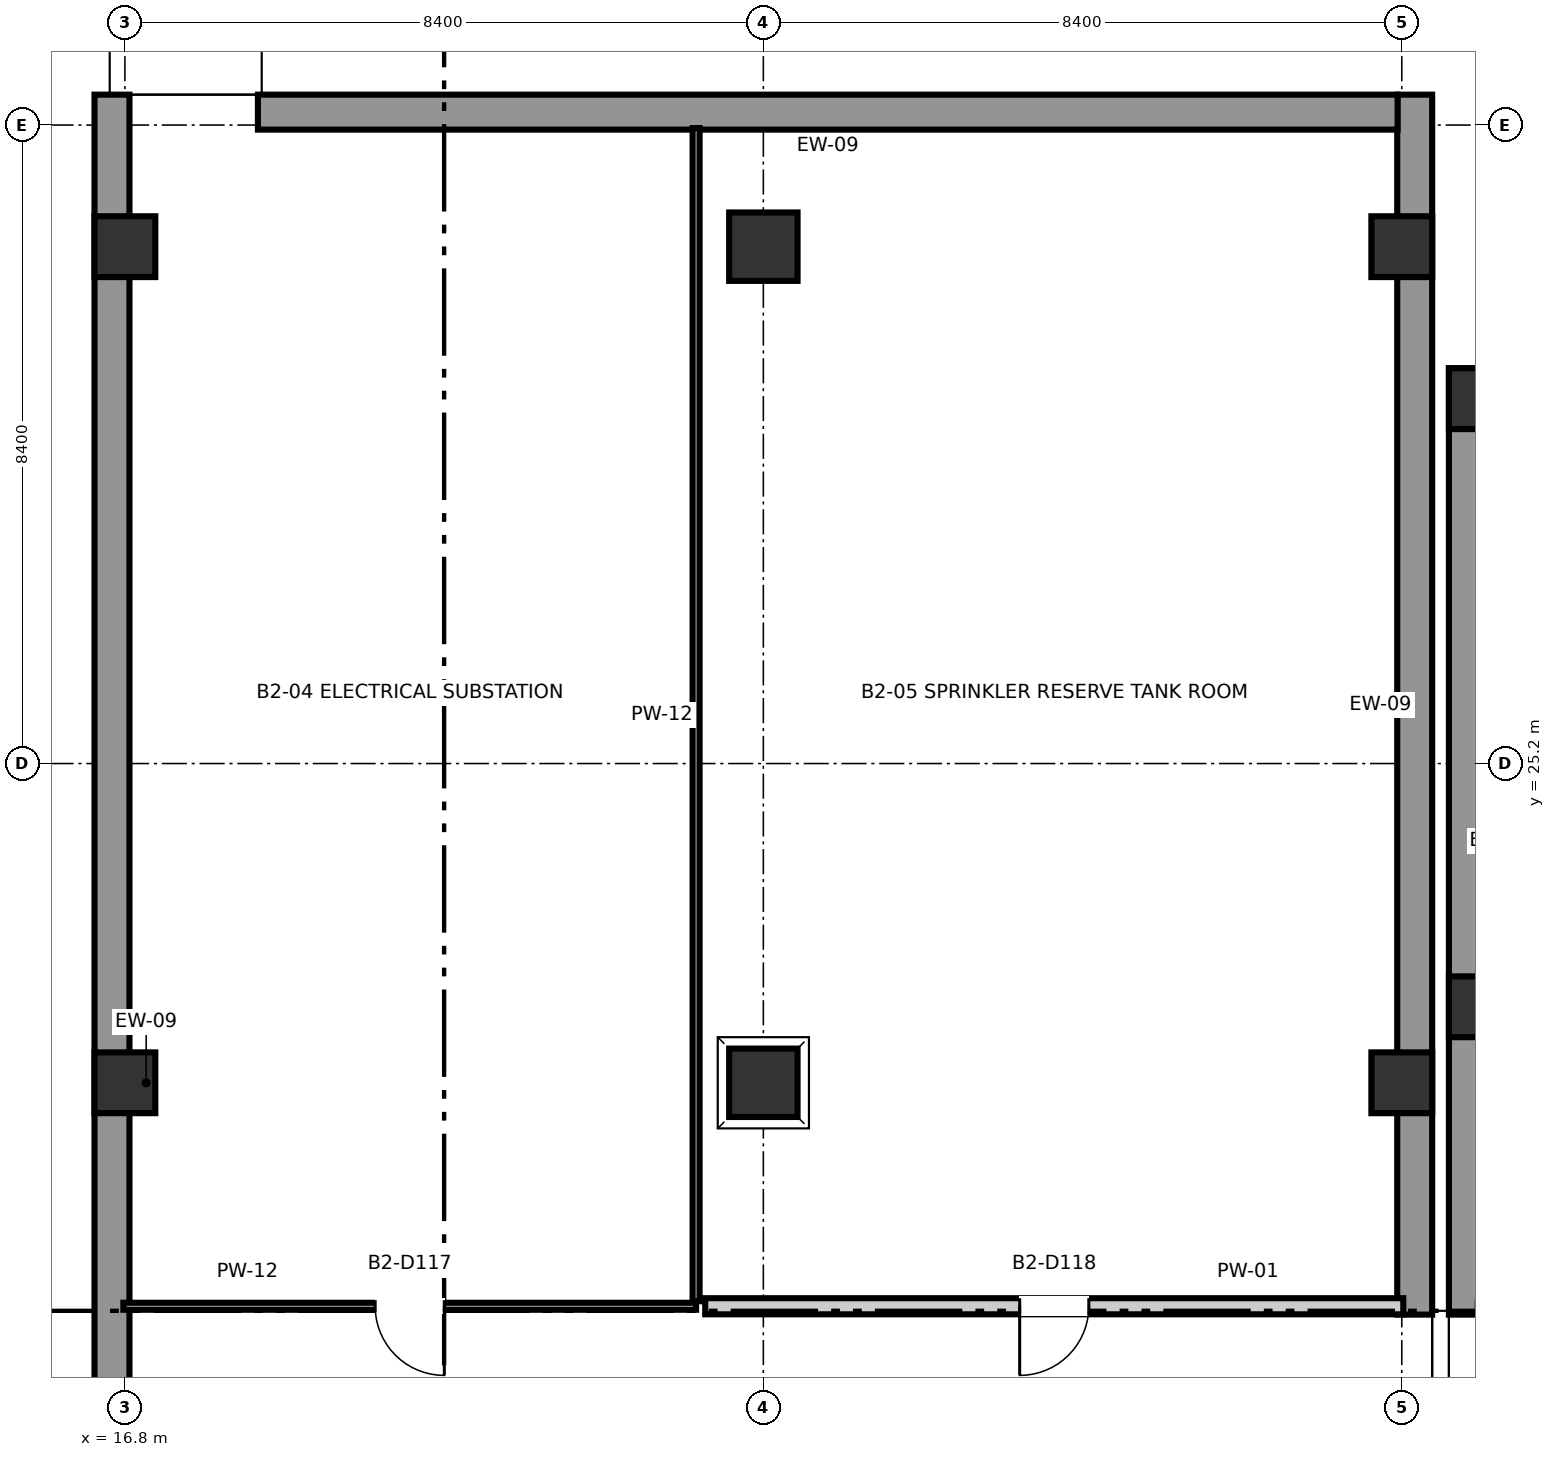
"""IFC4 building model, lengths in metres.
Left out: names, types, materials, properties, quantities, classifications, styles, units other than length and angle.
Written with IfcOpenShell. Run it as: python <this file> out.ifc"""

import sys

from ifc_helpers import new_model, si_unit, direction, frame, frame_2d, origin, origin_2d, place, context, subcontext, project, spatial, rectangle, extrude, element, fill, save


model = new_model("IFC4")
c1 = context("Model", 3, precision=1e-05, world=origin(), true_north=direction((0.0, 1.0)))
c2 = subcontext(c1, "Body", "Model", "MODEL_VIEW")
j1 = project(units=[si_unit("LENGTHUNIT", "METRE"), si_unit("PLANEANGLEUNIT", "RADIAN")], contexts=[c1])
p1 = place(None, origin())
s1 = spatial("IfcSite", under=j1, at=p1, CompositionType="ELEMENT")
p2 = place(p1, origin())
s2 = spatial("IfcBuilding", under=s1, at=p2, CompositionType="ELEMENT")
p3 = place(p2, frame((0.0, 0.0, -8.4)))
s3 = spatial("IfcBuildingStorey", under=s2, at=p3, CompositionType="ELEMENT", Elevation=-8.4)
for number, where, z_axis, x_axis in (
    (1, (16.8, 21.0, 0.0), (0.0, 0.0, 1.0), (1.0, 0.0, 0.0)),
    (2, (16.8, 32.0, 0.0), (0.0, 0.0, 1.0), (1.0, 0.0, 0.0)),
):
    element("IfcColumn", number, at=place(p3, frame(where, z_axis=z_axis, x_axis=x_axis)), inside=s3, PredefinedType="COLUMN", context=c2, shape_type="SweptSolid", body=[
        extrude(rectangle(XDim=0.8, YDim=0.8, at=origin_2d()), origin(), (0.0, 0.0, 1.0), 4.2),
    ])
for number, where, z_axis, x_axis in (
    (3, (25.2, 21.0, 0.0), (0.0, 0.0, 1.0), (1.0, 0.0, 0.0)),
    (4, (25.2, 32.0, 0.0), (0.0, 0.0, 1.0), (1.0, 0.0, 0.0)),
):
    element("IfcColumn", number, at=place(p3, frame(where, z_axis=z_axis, x_axis=x_axis)), inside=s3, PredefinedType="COLUMN", context=c2, shape_type="SweptSolid", body=[
        extrude(rectangle(XDim=0.9, YDim=0.9, at=origin_2d()), origin(), (0.0, 0.0, 1.0), 4.2),
    ])
for number, where, z_axis, x_axis in (
    (5, (33.6, 21.0, 0.0), (0.0, 0.0, 1.0), (1.0, 0.0, 0.0)),
    (6, (33.6, 32.0, 0.0), (0.0, 0.0, 1.0), (1.0, 0.0, 0.0)),
    (7, (34.62, 22.0, 0.0), (0.0, 0.0, 1.0), (1.0, 0.0, 0.0)),
    (8, (34.62, 30.0, 0.0), (0.0, 0.0, 1.0), (1.0, 0.0, 0.0)),
):
    element("IfcColumn", number, at=place(p3, frame(where, z_axis=z_axis, x_axis=x_axis)), inside=s3, PredefinedType="COLUMN", context=c2, shape_type="SweptSolid", body=[
        extrude(rectangle(XDim=0.8, YDim=0.8, at=origin_2d()), origin(), (0.0, 0.0, 1.0), 4.2),
    ])
p4 = place(p3, frame((33.77, 17.95, 0.0), z_axis=(0.0, 0.0, 1.0), x_axis=(0.0, 1.0, 0.0)))
e9 = element("IfcWall", 9, at=p4, inside=s3, PredefinedType="SOLIDWALL", context=c2, shape_type="SweptSolid", body=[
    extrude(rectangle(XDim=16.05, YDim=0.46, at=frame_2d((8.025, 0.0))), origin(), (0.0, 0.0, 1.0), 4.2),
])
p5 = place(p3, frame((33.545, 33.77, 0.0), z_axis=(0.0, 0.0, 1.0), x_axis=(-1.0, 0.0, 0.0)))
e10 = element("IfcWall", 10, at=p5, inside=s3, PredefinedType="SOLIDWALL", context=c2, shape_type="SweptSolid", body=[
    extrude(rectangle(XDim=14.995, YDim=0.46, at=frame_2d((7.498, 0.0))), origin(), (0.0, 0.0, 1.0), 4.2),
])
p6 = place(p3, frame((16.63, 34.0, 0.0), z_axis=(0.0, 0.0, 1.0), x_axis=(0.0, -1.0, 0.0)))
e11 = element("IfcWall", 11, at=p6, inside=s3, PredefinedType="SOLIDWALL", context=c2, shape_type="SweptSolid", body=[
    extrude(rectangle(XDim=26.0, YDim=0.46, at=frame_2d((13.0, 0.0))), origin(), (0.0, 0.0, 1.0), 4.2),
])
p7 = place(p3, frame((34.45, 30.4, 0.0), z_axis=(0.0, 0.0, 1.0), x_axis=(0.0, -1.0, 0.0)))
e12 = element("IfcWall", 12, at=p7, inside=s3, PredefinedType="SOLIDWALL", context=c2, shape_type="SweptSolid", body=[
    extrude(rectangle(XDim=12.45, YDim=0.46, at=frame_2d((6.225, 0.0))), origin(), (0.0, 0.0, 1.0), 4.2),
])
p8 = place(p3, frame((16.78, 18.06, 0.0), z_axis=(0.0, 0.0, 1.0), x_axis=(1.0, 0.0, 0.0)))
e13 = element("IfcWall", 13, at=p8, inside=s3, PredefinedType="PARTITIONING", context=c2, shape_type="SweptSolid", body=[
    extrude(rectangle(XDim=7.535, YDim=0.092, at=frame_2d((3.768, 0.0))), origin(), (0.0, 0.0, 1.0), 3.88),
])
p9 = place(p8, frame((3.312, 0.0, 0.0)))
e14 = element("IfcOpeningElement", 14, at=p9, cuts=e13, PredefinedType="OPENING", context=c2, shape_type="SweptSolid", body=[
    extrude(rectangle(XDim=0.91, YDim=2.04, at=frame_2d((0.455, 1.02))), frame((0.0, 0.061, 0.0), z_axis=(0.0, -1.0, 0.0), x_axis=(1.0, 0.0, 0.0)), (0.0, 0.0, 1.0), 0.122),
])
p10 = place(p3, frame((24.315, 18.126, 0.0), z_axis=(0.0, 0.0, 1.0), x_axis=(0.0, 1.0, 0.0)))
e15 = element("IfcWall", 15, at=p10, inside=s3, PredefinedType="PARTITIONING", context=c2, shape_type="SweptSolid", body=[
    extrude(rectangle(XDim=15.434, YDim=0.092, at=frame_2d((7.717, 0.0))), origin(), (0.0, 0.0, 1.0), 3.88),
])
p11 = place(p3, frame((24.435, 18.06, 0.0), z_axis=(0.0, 0.0, 1.0), x_axis=(1.0, 0.0, 0.0)))
e16 = element("IfcWall", 16, at=p11, inside=s3, PredefinedType="PARTITIONING", context=c2, shape_type="SweptSolid", body=[
    extrude(rectangle(XDim=9.185, YDim=0.212, at=frame_2d((4.593, 0.0))), origin(), (0.0, 0.0, 1.0), 3.88),
])
p12 = place(p11, frame((4.137, 0.0, 0.0)))
e17 = element("IfcOpeningElement", 17, at=p12, cuts=e16, PredefinedType="OPENING", context=c2, shape_type="SweptSolid", body=[
    extrude(rectangle(XDim=0.91, YDim=2.04, at=frame_2d((0.455, 1.02))), frame((0.0, 0.121, 0.0), z_axis=(0.0, -1.0, 0.0), x_axis=(1.0, 0.0, 0.0)), (0.0, 0.0, 1.0), 0.242),
])
p13 = place(p9, origin())
e18 = element("IfcDoor", 18, at=p13, inside=s3, OperationType="SINGLE_SWING_RIGHT", PredefinedType="DOOR", context=c2, shape_type="SweptSolid", body=[
    extrude(rectangle(XDim=0.91, YDim=2.04, at=frame_2d((0.455, 1.02))), frame((0.0, 0.025, 0.0), z_axis=(0.0, -1.0, 0.0), x_axis=(1.0, 0.0, 0.0)), (0.0, 0.0, 1.0), 0.05),
])
fill(e14, e18)
p14 = place(p12, origin())
e19 = element("IfcDoor", 19, at=p14, inside=s3, OperationType="SINGLE_SWING_LEFT", PredefinedType="DOOR", context=c2, shape_type="SweptSolid", body=[
    extrude(rectangle(XDim=0.91, YDim=2.04, at=frame_2d((0.455, 1.02))), frame((0.0, 0.025, 0.0), z_axis=(0.0, -1.0, 0.0), x_axis=(1.0, 0.0, 0.0)), (0.0, 0.0, 1.0), 0.05),
])
fill(e17, e19)
save(model, sys.argv[1])
